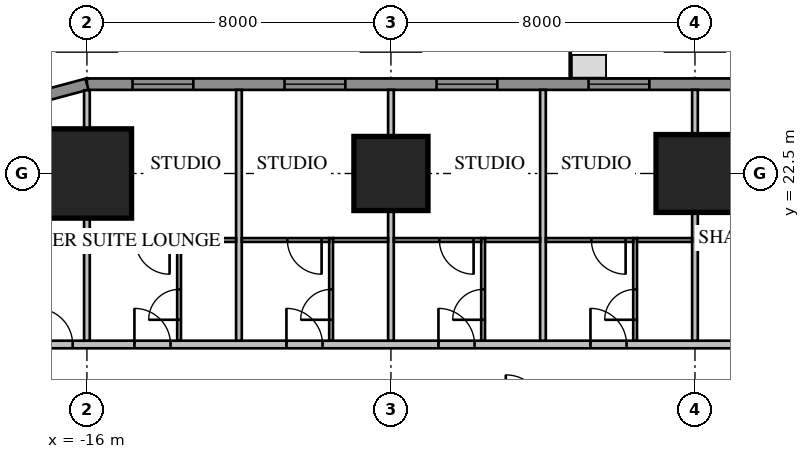
"""IFC4 building model, lengths in metres.
Left out: names, types, materials, properties, quantities, classifications, styles, units other than length and angle.
Written with IfcOpenShell. Run it as: python <this file> out.ifc"""

import sys

from ifc_helpers import new_model, si_unit, direction, frame, frame_2d, origin, origin_2d, place, context, subcontext, project, spatial, rectangle, extrude, element, fill, save


model = new_model("IFC4")
c1 = context("Model", 3, precision=1e-05, world=origin(), true_north=direction((0.0, 1.0)))
c2 = subcontext(c1, "Body", "Model", "MODEL_VIEW")
j1 = project(units=[si_unit("LENGTHUNIT", "METRE"), si_unit("PLANEANGLEUNIT", "RADIAN")], contexts=[c1])
p1 = place(None, origin())
s1 = spatial("IfcSite", under=j1, at=p1, CompositionType="ELEMENT")
p2 = place(p1, origin())
s2 = spatial("IfcBuilding", under=s1, at=p2, CompositionType="ELEMENT")
p3 = place(p2, frame((0.0, 0.0, 27.55)))
s3 = spatial("IfcBuildingStorey", under=s2, at=p3, CompositionType="ELEMENT", Elevation=27.55)
p4 = place(p3, frame((0.0, 22.5, 0.0), z_axis=(0.0, 0.0, 1.0), x_axis=(1.0, 0.0, 0.0)))
e1 = element("IfcColumn", 1, at=p4, inside=s3, PredefinedType="COLUMN", context=c2, shape_type="SweptSolid", body=[
    extrude(rectangle(XDim=2.05, YDim=2.05, at=origin_2d()), origin(), (0.0, 0.0, 1.0), 3.85),
])
p5 = place(p3, frame((-8.0, 22.5, 0.0), z_axis=(0.0, 0.0, 1.0), x_axis=(1.0, 0.0, 0.0)))
e2 = element("IfcColumn", 2, at=p5, inside=s3, PredefinedType="COLUMN", context=c2, shape_type="SweptSolid", body=[
    extrude(rectangle(XDim=1.95, YDim=1.95, at=origin_2d()), origin(), (0.0, 0.0, 1.0), 3.85),
])
p6 = place(p3, frame((-16.0, 22.5, 0.0), z_axis=(0.0, 0.0, 1.0), x_axis=(1.0, 0.0, 0.0)))
e3 = element("IfcColumn", 3, at=p6, inside=s3, PredefinedType="COLUMN", context=c2, shape_type="SweptSolid", body=[
    extrude(rectangle(XDim=2.35, YDim=2.35, at=origin_2d()), origin(), (0.0, 0.0, 1.0), 3.85),
])
p7 = place(p3, frame((16.0, 24.85, 0.0), z_axis=(0.0, 0.0, 1.0), x_axis=(-1.0, 0.0, 0.0)))
e4 = element("IfcWall", 4, at=p7, inside=s3, PredefinedType="SOLIDWALL", context=c2, shape_type="SweptSolid", body=[
    extrude(rectangle(XDim=32.0, YDim=0.3, at=frame_2d((16.0, 0.0))), origin(), (0.0, 0.0, 1.0), 3.65),
])
p8 = place(p7, frame((1.2, 0.0, 0.75)))
e5 = element("IfcOpeningElement", 5, at=p8, cuts=e4, PredefinedType="OPENING", context=c2, shape_type="SweptSolid", body=[
    extrude(rectangle(XDim=1.6, YDim=1.8, at=frame_2d((0.8, 0.9))), frame((0.0, 0.17, 0.0), z_axis=(0.0, -1.0, 0.0), x_axis=(1.0, 0.0, 0.0)), (0.0, 0.0, 1.0), 0.34),
])
p9 = place(p7, frame((5.2, 0.0, 0.75)))
e6 = element("IfcOpeningElement", 6, at=p9, cuts=e4, PredefinedType="OPENING", context=c2, shape_type="SweptSolid", body=[
    extrude(rectangle(XDim=1.6, YDim=1.8, at=frame_2d((0.8, 0.9))), frame((0.0, 0.17, 0.0), z_axis=(0.0, -1.0, 0.0), x_axis=(1.0, 0.0, 0.0)), (0.0, 0.0, 1.0), 0.34),
])
p10 = place(p7, frame((17.2, 0.0, 0.75)))
e7 = element("IfcOpeningElement", 7, at=p10, cuts=e4, PredefinedType="OPENING", context=c2, shape_type="SweptSolid", body=[
    extrude(rectangle(XDim=1.6, YDim=1.8, at=frame_2d((0.8, 0.9))), frame((0.0, 0.17, 0.0), z_axis=(0.0, -1.0, 0.0), x_axis=(1.0, 0.0, 0.0)), (0.0, 0.0, 1.0), 0.34),
])
p11 = place(p7, frame((21.2, 0.0, 0.75)))
e8 = element("IfcOpeningElement", 8, at=p11, cuts=e4, PredefinedType="OPENING", context=c2, shape_type="SweptSolid", body=[
    extrude(rectangle(XDim=1.6, YDim=1.8, at=frame_2d((0.8, 0.9))), frame((0.0, 0.17, 0.0), z_axis=(0.0, -1.0, 0.0), x_axis=(1.0, 0.0, 0.0)), (0.0, 0.0, 1.0), 0.34),
])
p12 = place(p7, frame((25.2, 0.0, 0.75)))
e9 = element("IfcOpeningElement", 9, at=p12, cuts=e4, PredefinedType="OPENING", context=c2, shape_type="SweptSolid", body=[
    extrude(rectangle(XDim=1.6, YDim=1.8, at=frame_2d((0.8, 0.9))), frame((0.0, 0.17, 0.0), z_axis=(0.0, -1.0, 0.0), x_axis=(1.0, 0.0, 0.0)), (0.0, 0.0, 1.0), 0.34),
])
p13 = place(p7, frame((29.2, 0.0, 0.75)))
e10 = element("IfcOpeningElement", 10, at=p13, cuts=e4, PredefinedType="OPENING", context=c2, shape_type="SweptSolid", body=[
    extrude(rectangle(XDim=1.6, YDim=1.8, at=frame_2d((0.8, 0.9))), frame((0.0, 0.17, 0.0), z_axis=(0.0, -1.0, 0.0), x_axis=(1.0, 0.0, 0.0)), (0.0, 0.0, 1.0), 0.34),
])
p14 = place(p7, frame((8.8, 0.0, 0.75)))
e11 = element("IfcOpeningElement", 11, at=p14, cuts=e4, PredefinedType="OPENING", context=c2, shape_type="SweptSolid", body=[
    extrude(rectangle(XDim=2.4, YDim=1.8, at=frame_2d((1.2, 0.9))), frame((0.0, 0.17, 0.0), z_axis=(0.0, -1.0, 0.0), x_axis=(1.0, 0.0, 0.0)), (0.0, 0.0, 1.0), 0.34),
])
p15 = place(p7, frame((13.812, 0.0, 0.0)))
e12 = element("IfcOpeningElement", 12, at=p15, cuts=e4, PredefinedType="OPENING", context=c2, shape_type="SweptSolid", body=[
    extrude(rectangle(XDim=1.0, YDim=2.4, at=frame_2d((0.5, 1.2))), frame((0.0, 0.17, 0.0), z_axis=(0.0, -1.0, 0.0), x_axis=(1.0, 0.0, 0.0)), (0.0, 0.0, 1.0), 0.34),
])
p16 = place(p3, frame((-16.0, 24.85, 0.0), z_axis=(0.0, 0.0, 1.0), x_axis=(-0.965920218567, -0.258839972501, 0.0)))
e13 = element("IfcWall", 13, at=p16, inside=s3, PredefinedType="SOLIDWALL", context=c2, shape_type="SweptSolid", body=[
    extrude(rectangle(XDim=4.581, YDim=0.3, at=frame_2d((2.291, 0.0))), origin(), (0.0, 0.0, 1.0), 3.65),
])
p17 = place(p3, frame((18.0, 18.0, 0.0), z_axis=(0.0, 0.0, 1.0), x_axis=(-1.0, 0.0, 0.0)))
e14 = element("IfcWall", 14, at=p17, inside=s3, PredefinedType="PARTITIONING", context=c2, shape_type="SweptSolid", body=[
    extrude(rectangle(XDim=36.0, YDim=0.2, at=frame_2d((18.0, 0.0))), origin(), (0.0, 0.0, 1.0), 3.65),
])
p18 = place(p17, frame((0.375, 0.0, 0.0)))
e15 = element("IfcOpeningElement", 15, at=p18, cuts=e14, PredefinedType="OPENING", context=c2, shape_type="SweptSolid", body=[
    extrude(rectangle(XDim=1.0, YDim=2.1, at=frame_2d((0.5, 1.05))), frame((0.0, 0.12, 0.0), z_axis=(0.0, -1.0, 0.0), x_axis=(1.0, 0.0, 0.0)), (0.0, 0.0, 1.0), 0.24),
])
p19 = place(p17, frame((3.8, 0.0, 0.0)))
e16 = element("IfcOpeningElement", 16, at=p19, cuts=e14, PredefinedType="OPENING", context=c2, shape_type="SweptSolid", body=[
    extrude(rectangle(XDim=0.95, YDim=2.1, at=frame_2d((0.475, 1.05))), frame((0.0, 0.12, 0.0), z_axis=(0.0, -1.0, 0.0), x_axis=(1.0, 0.0, 0.0)), (0.0, 0.0, 1.0), 0.24),
])
p20 = place(p17, frame((7.8, 0.0, 0.0)))
e17 = element("IfcOpeningElement", 17, at=p20, cuts=e14, PredefinedType="OPENING", context=c2, shape_type="SweptSolid", body=[
    extrude(rectangle(XDim=0.95, YDim=2.1, at=frame_2d((0.475, 1.05))), frame((0.0, 0.12, 0.0), z_axis=(0.0, -1.0, 0.0), x_axis=(1.0, 0.0, 0.0)), (0.0, 0.0, 1.0), 0.24),
])
p21 = place(p17, frame((19.8, 0.0, 0.0)))
e18 = element("IfcOpeningElement", 18, at=p21, cuts=e14, PredefinedType="OPENING", context=c2, shape_type="SweptSolid", body=[
    extrude(rectangle(XDim=0.95, YDim=2.1, at=frame_2d((0.475, 1.05))), frame((0.0, 0.12, 0.0), z_axis=(0.0, -1.0, 0.0), x_axis=(1.0, 0.0, 0.0)), (0.0, 0.0, 1.0), 0.24),
])
p22 = place(p17, frame((23.8, 0.0, 0.0)))
e19 = element("IfcOpeningElement", 19, at=p22, cuts=e14, PredefinedType="OPENING", context=c2, shape_type="SweptSolid", body=[
    extrude(rectangle(XDim=0.95, YDim=2.1, at=frame_2d((0.475, 1.05))), frame((0.0, 0.12, 0.0), z_axis=(0.0, -1.0, 0.0), x_axis=(1.0, 0.0, 0.0)), (0.0, 0.0, 1.0), 0.24),
])
p23 = place(p17, frame((27.8, 0.0, 0.0)))
e20 = element("IfcOpeningElement", 20, at=p23, cuts=e14, PredefinedType="OPENING", context=c2, shape_type="SweptSolid", body=[
    extrude(rectangle(XDim=0.95, YDim=2.1, at=frame_2d((0.475, 1.05))), frame((0.0, 0.12, 0.0), z_axis=(0.0, -1.0, 0.0), x_axis=(1.0, 0.0, 0.0)), (0.0, 0.0, 1.0), 0.24),
])
p24 = place(p17, frame((31.8, 0.0, 0.0)))
e21 = element("IfcOpeningElement", 21, at=p24, cuts=e14, PredefinedType="OPENING", context=c2, shape_type="SweptSolid", body=[
    extrude(rectangle(XDim=0.95, YDim=2.1, at=frame_2d((0.475, 1.05))), frame((0.0, 0.12, 0.0), z_axis=(0.0, -1.0, 0.0), x_axis=(1.0, 0.0, 0.0)), (0.0, 0.0, 1.0), 0.24),
])
p25 = place(p17, frame((34.375, 0.0, 0.0)))
e22 = element("IfcOpeningElement", 22, at=p25, cuts=e14, PredefinedType="OPENING", context=c2, shape_type="SweptSolid", body=[
    extrude(rectangle(XDim=0.95, YDim=2.1, at=frame_2d((0.475, 1.05))), frame((0.0, 0.12, 0.0), z_axis=(0.0, -1.0, 0.0), x_axis=(1.0, 0.0, 0.0)), (0.0, 0.0, 1.0), 0.24),
])
p26 = place(p17, frame((11.2, 0.0, 0.0)))
e23 = element("IfcOpeningElement", 23, at=p26, cuts=e14, PredefinedType="OPENING", context=c2, shape_type="SweptSolid", body=[
    extrude(rectangle(XDim=1.0, YDim=2.1, at=frame_2d((0.5, 1.05))), frame((0.0, 0.12, 0.0), z_axis=(0.0, -1.0, 0.0), x_axis=(1.0, 0.0, 0.0)), (0.0, 0.0, 1.0), 0.24),
])
p27 = place(p3, frame((0.0, 18.1, 0.0), z_axis=(0.0, 0.0, 1.0), x_axis=(0.0, 1.0, 0.0)))
e24 = element("IfcWall", 24, at=p27, inside=s3, PredefinedType="PARTITIONING", context=c2, shape_type="SweptSolid", body=[
    extrude(rectangle(XDim=6.6, YDim=0.15, at=frame_2d((3.3, 0.0))), origin(), (0.0, 0.0, 1.0), 2.809),
])
for number, where, z_axis, x_axis in (
    (25, (-4.0, 18.1, 0.0), (0.0, 0.0, 1.0), (0.0, 1.0, 0.0)),
    (26, (-8.0, 18.1, 0.0), (0.0, 0.0, 1.0), (0.0, 1.0, 0.0)),
    (27, (-12.0, 18.1, 0.0), (0.0, 0.0, 1.0), (0.0, 1.0, 0.0)),
):
    element("IfcWall", number, at=place(p3, frame(where, z_axis=z_axis, x_axis=x_axis)), inside=s3, PredefinedType="PARTITIONING", context=c2, shape_type="SweptSolid", body=[
        extrude(rectangle(XDim=6.6, YDim=0.15, at=frame_2d((3.3, 0.0))), origin(), (0.0, 0.0, 1.0), 3.65),
    ])
p28 = place(p3, frame((-16.0, 18.1, 0.0), z_axis=(0.0, 0.0, 1.0), x_axis=(0.0, 1.0, 0.0)))
e28 = element("IfcWall", 28, at=p28, inside=s3, PredefinedType="PARTITIONING", context=c2, shape_type="SweptSolid", body=[
    extrude(rectangle(XDim=6.589, YDim=0.15, at=frame_2d((3.295, 0.0))), origin(), (0.0, 0.0, 1.0), 3.65),
])
p29 = place(p3, frame((-1.575, 18.1, 0.0), z_axis=(0.0, 0.0, 1.0), x_axis=(0.0, 1.0, 0.0)))
e29 = element("IfcWall", 29, at=p29, inside=s3, PredefinedType="PARTITIONING", context=c2, shape_type="SweptSolid", body=[
    extrude(rectangle(XDim=2.7, YDim=0.1, at=frame_2d((1.35, 0.0))), origin(), (0.0, 0.0, 1.0), 3.65),
])
p30 = place(p29, frame((0.55, 0.0, 0.0)))
e30 = element("IfcOpeningElement", 30, at=p30, cuts=e29, PredefinedType="OPENING", context=c2, shape_type="SweptSolid", body=[
    extrude(rectangle(XDim=0.8, YDim=2.1, at=frame_2d((0.4, 1.05))), frame((0.0, 0.07, 0.0), z_axis=(0.0, -1.0, 0.0), x_axis=(1.0, 0.0, 0.0)), (0.0, 0.0, 1.0), 0.14),
])
p31 = place(p3, frame((-0.075, 20.75, 0.0), z_axis=(0.0, 0.0, 1.0), x_axis=(-1.0, 0.0, 0.0)))
e31 = element("IfcWall", 31, at=p31, inside=s3, PredefinedType="PARTITIONING", context=c2, shape_type="SweptSolid", body=[
    extrude(rectangle(XDim=1.45, YDim=0.1, at=frame_2d((0.725, 0.0))), origin(), (0.0, 0.0, 1.0), 3.65),
])
p32 = place(p3, frame((-5.575, 18.1, 0.0), z_axis=(0.0, 0.0, 1.0), x_axis=(0.0, 1.0, 0.0)))
e32 = element("IfcWall", 32, at=p32, inside=s3, PredefinedType="PARTITIONING", context=c2, shape_type="SweptSolid", body=[
    extrude(rectangle(XDim=2.7, YDim=0.1, at=frame_2d((1.35, 0.0))), origin(), (0.0, 0.0, 1.0), 3.65),
])
p33 = place(p32, frame((0.55, 0.0, 0.0)))
e33 = element("IfcOpeningElement", 33, at=p33, cuts=e32, PredefinedType="OPENING", context=c2, shape_type="SweptSolid", body=[
    extrude(rectangle(XDim=0.8, YDim=2.1, at=frame_2d((0.4, 1.05))), frame((0.0, 0.07, 0.0), z_axis=(0.0, -1.0, 0.0), x_axis=(1.0, 0.0, 0.0)), (0.0, 0.0, 1.0), 0.14),
])
p34 = place(p3, frame((-4.075, 20.75, 0.0), z_axis=(0.0, 0.0, 1.0), x_axis=(-1.0, 0.0, 0.0)))
e34 = element("IfcWall", 34, at=p34, inside=s3, PredefinedType="PARTITIONING", context=c2, shape_type="SweptSolid", body=[
    extrude(rectangle(XDim=1.45, YDim=0.1, at=frame_2d((0.725, 0.0))), origin(), (0.0, 0.0, 1.0), 3.65),
])
p35 = place(p3, frame((-9.575, 18.1, 0.0), z_axis=(0.0, 0.0, 1.0), x_axis=(0.0, 1.0, 0.0)))
e35 = element("IfcWall", 35, at=p35, inside=s3, PredefinedType="PARTITIONING", context=c2, shape_type="SweptSolid", body=[
    extrude(rectangle(XDim=2.7, YDim=0.1, at=frame_2d((1.35, 0.0))), origin(), (0.0, 0.0, 1.0), 3.65),
])
p36 = place(p35, frame((0.55, 0.0, 0.0)))
e36 = element("IfcOpeningElement", 36, at=p36, cuts=e35, PredefinedType="OPENING", context=c2, shape_type="SweptSolid", body=[
    extrude(rectangle(XDim=0.8, YDim=2.1, at=frame_2d((0.4, 1.05))), frame((0.0, 0.07, 0.0), z_axis=(0.0, -1.0, 0.0), x_axis=(1.0, 0.0, 0.0)), (0.0, 0.0, 1.0), 0.14),
])
p37 = place(p3, frame((-8.075, 20.75, 0.0), z_axis=(0.0, 0.0, 1.0), x_axis=(-1.0, 0.0, 0.0)))
e37 = element("IfcWall", 37, at=p37, inside=s3, PredefinedType="PARTITIONING", context=c2, shape_type="SweptSolid", body=[
    extrude(rectangle(XDim=1.45, YDim=0.1, at=frame_2d((0.725, 0.0))), origin(), (0.0, 0.0, 1.0), 3.65),
])
p38 = place(p3, frame((-13.575, 18.1, 0.0), z_axis=(0.0, 0.0, 1.0), x_axis=(0.0, 1.0, 0.0)))
e38 = element("IfcWall", 38, at=p38, inside=s3, PredefinedType="PARTITIONING", context=c2, shape_type="SweptSolid", body=[
    extrude(rectangle(XDim=2.7, YDim=0.1, at=frame_2d((1.35, 0.0))), origin(), (0.0, 0.0, 1.0), 3.65),
])
p39 = place(p38, frame((0.55, 0.0, 0.0)))
e39 = element("IfcOpeningElement", 39, at=p39, cuts=e38, PredefinedType="OPENING", context=c2, shape_type="SweptSolid", body=[
    extrude(rectangle(XDim=0.8, YDim=2.1, at=frame_2d((0.4, 1.05))), frame((0.0, 0.07, 0.0), z_axis=(0.0, -1.0, 0.0), x_axis=(1.0, 0.0, 0.0)), (0.0, 0.0, 1.0), 0.14),
])
p40 = place(p3, frame((-12.075, 20.75, 0.0), z_axis=(0.0, 0.0, 1.0), x_axis=(-1.0, 0.0, 0.0)))
e40 = element("IfcWall", 40, at=p40, inside=s3, PredefinedType="PARTITIONING", context=c2, shape_type="SweptSolid", body=[
    extrude(rectangle(XDim=1.45, YDim=0.1, at=frame_2d((0.725, 0.0))), origin(), (0.0, 0.0, 1.0), 3.65),
])
p41 = place(p3, frame((-1.625, 20.75, 0.0), z_axis=(0.0, 0.0, 1.0), x_axis=(-1.0, 0.0, 0.0)))
e41 = element("IfcWall", 41, at=p41, inside=s3, PredefinedType="PARTITIONING", context=c2, shape_type="SweptSolid", body=[
    extrude(rectangle(XDim=2.3, YDim=0.1, at=frame_2d((1.15, 0.0))), origin(), (0.0, 0.0, 1.0), 3.65),
])
p42 = place(p41, frame((0.2, 0.0, 0.0)))
e42 = element("IfcOpeningElement", 42, at=p42, cuts=e41, PredefinedType="OPENING", context=c2, shape_type="SweptSolid", body=[
    extrude(rectangle(XDim=0.9, YDim=2.1, at=frame_2d((0.45, 1.05))), frame((0.0, 0.07, 0.0), z_axis=(0.0, -1.0, 0.0), x_axis=(1.0, 0.0, 0.0)), (0.0, 0.0, 1.0), 0.14),
])
p43 = place(p3, frame((-5.625, 20.75, 0.0), z_axis=(0.0, 0.0, 1.0), x_axis=(-1.0, 0.0, 0.0)))
e43 = element("IfcWall", 43, at=p43, inside=s3, PredefinedType="PARTITIONING", context=c2, shape_type="SweptSolid", body=[
    extrude(rectangle(XDim=2.3, YDim=0.1, at=frame_2d((1.15, 0.0))), origin(), (0.0, 0.0, 1.0), 3.65),
])
p44 = place(p43, frame((0.2, 0.0, 0.0)))
e44 = element("IfcOpeningElement", 44, at=p44, cuts=e43, PredefinedType="OPENING", context=c2, shape_type="SweptSolid", body=[
    extrude(rectangle(XDim=0.9, YDim=2.1, at=frame_2d((0.45, 1.05))), frame((0.0, 0.07, 0.0), z_axis=(0.0, -1.0, 0.0), x_axis=(1.0, 0.0, 0.0)), (0.0, 0.0, 1.0), 0.14),
])
p45 = place(p3, frame((-9.625, 20.75, 0.0), z_axis=(0.0, 0.0, 1.0), x_axis=(-1.0, 0.0, 0.0)))
e45 = element("IfcWall", 45, at=p45, inside=s3, PredefinedType="PARTITIONING", context=c2, shape_type="SweptSolid", body=[
    extrude(rectangle(XDim=2.3, YDim=0.1, at=frame_2d((1.15, 0.0))), origin(), (0.0, 0.0, 1.0), 3.65),
])
p46 = place(p45, frame((0.2, 0.0, 0.0)))
e46 = element("IfcOpeningElement", 46, at=p46, cuts=e45, PredefinedType="OPENING", context=c2, shape_type="SweptSolid", body=[
    extrude(rectangle(XDim=0.9, YDim=2.1, at=frame_2d((0.45, 1.05))), frame((0.0, 0.07, 0.0), z_axis=(0.0, -1.0, 0.0), x_axis=(1.0, 0.0, 0.0)), (0.0, 0.0, 1.0), 0.14),
])
p47 = place(p3, frame((-13.625, 20.75, 0.0), z_axis=(0.0, 0.0, 1.0), x_axis=(-1.0, 0.0, 0.0)))
e47 = element("IfcWall", 47, at=p47, inside=s3, PredefinedType="PARTITIONING", context=c2, shape_type="SweptSolid", body=[
    extrude(rectangle(XDim=2.3, YDim=0.1, at=frame_2d((1.15, 0.0))), origin(), (0.0, 0.0, 1.0), 3.65),
])
p48 = place(p47, frame((0.2, 0.0, 0.0)))
e48 = element("IfcOpeningElement", 48, at=p48, cuts=e47, PredefinedType="OPENING", context=c2, shape_type="SweptSolid", body=[
    extrude(rectangle(XDim=0.9, YDim=2.1, at=frame_2d((0.45, 1.05))), frame((0.0, 0.07, 0.0), z_axis=(0.0, -1.0, 0.0), x_axis=(1.0, 0.0, 0.0)), (0.0, 0.0, 1.0), 0.14),
])
p49 = place(p10, origin())
e49 = element("IfcWindow", 49, at=p49, inside=s3, PartitioningType="SINGLE_PANEL", PredefinedType="WINDOW", context=c2, shape_type="SweptSolid", body=[
    extrude(rectangle(XDim=1.6, YDim=1.8, at=frame_2d((0.8, 0.9))), frame((0.0, 0.03, 0.0), z_axis=(0.0, -1.0, 0.0), x_axis=(1.0, 0.0, 0.0)), (0.0, 0.0, 1.0), 0.06),
])
fill(e7, e49)
p50 = place(p11, origin())
e50 = element("IfcWindow", 50, at=p50, inside=s3, PartitioningType="SINGLE_PANEL", PredefinedType="WINDOW", context=c2, shape_type="SweptSolid", body=[
    extrude(rectangle(XDim=1.6, YDim=1.8, at=frame_2d((0.8, 0.9))), frame((0.0, 0.03, 0.0), z_axis=(0.0, -1.0, 0.0), x_axis=(1.0, 0.0, 0.0)), (0.0, 0.0, 1.0), 0.06),
])
fill(e8, e50)
p51 = place(p12, origin())
e51 = element("IfcWindow", 51, at=p51, inside=s3, PartitioningType="SINGLE_PANEL", PredefinedType="WINDOW", context=c2, shape_type="SweptSolid", body=[
    extrude(rectangle(XDim=1.6, YDim=1.8, at=frame_2d((0.8, 0.9))), frame((0.0, 0.03, 0.0), z_axis=(0.0, -1.0, 0.0), x_axis=(1.0, 0.0, 0.0)), (0.0, 0.0, 1.0), 0.06),
])
fill(e9, e51)
p52 = place(p13, origin())
e52 = element("IfcWindow", 52, at=p52, inside=s3, PartitioningType="SINGLE_PANEL", PredefinedType="WINDOW", context=c2, shape_type="SweptSolid", body=[
    extrude(rectangle(XDim=1.6, YDim=1.8, at=frame_2d((0.8, 0.9))), frame((0.0, 0.03, 0.0), z_axis=(0.0, -1.0, 0.0), x_axis=(1.0, 0.0, 0.0)), (0.0, 0.0, 1.0), 0.06),
])
fill(e10, e52)
p53 = place(p21, origin())
e53 = element("IfcDoor", 53, at=p53, inside=s3, OperationType="SINGLE_SWING_RIGHT", PredefinedType="DOOR", context=c2, shape_type="SweptSolid", body=[
    extrude(rectangle(XDim=0.95, YDim=2.1, at=frame_2d((0.475, 1.05))), frame((0.0, 0.025, 0.0), z_axis=(0.0, -1.0, 0.0), x_axis=(1.0, 0.0, 0.0)), (0.0, 0.0, 1.0), 0.05),
])
fill(e18, e53)
p54 = place(p30, origin())
e54 = element("IfcDoor", 54, at=p54, inside=s3, OperationType="SINGLE_SWING_LEFT", PredefinedType="DOOR", context=c2, shape_type="SweptSolid", body=[
    extrude(rectangle(XDim=0.8, YDim=2.1, at=frame_2d((0.4, 1.05))), frame((0.0, 0.025, 0.0), z_axis=(0.0, -1.0, 0.0), x_axis=(1.0, 0.0, 0.0)), (0.0, 0.0, 1.0), 0.05),
])
fill(e30, e54)
p55 = place(p22, origin())
e55 = element("IfcDoor", 55, at=p55, inside=s3, OperationType="SINGLE_SWING_RIGHT", PredefinedType="DOOR", context=c2, shape_type="SweptSolid", body=[
    extrude(rectangle(XDim=0.95, YDim=2.1, at=frame_2d((0.475, 1.05))), frame((0.0, 0.025, 0.0), z_axis=(0.0, -1.0, 0.0), x_axis=(1.0, 0.0, 0.0)), (0.0, 0.0, 1.0), 0.05),
])
fill(e19, e55)
p56 = place(p33, origin())
e56 = element("IfcDoor", 56, at=p56, inside=s3, OperationType="SINGLE_SWING_LEFT", PredefinedType="DOOR", context=c2, shape_type="SweptSolid", body=[
    extrude(rectangle(XDim=0.8, YDim=2.1, at=frame_2d((0.4, 1.05))), frame((0.0, 0.025, 0.0), z_axis=(0.0, -1.0, 0.0), x_axis=(1.0, 0.0, 0.0)), (0.0, 0.0, 1.0), 0.05),
])
fill(e33, e56)
p57 = place(p23, origin())
e57 = element("IfcDoor", 57, at=p57, inside=s3, OperationType="SINGLE_SWING_RIGHT", PredefinedType="DOOR", context=c2, shape_type="SweptSolid", body=[
    extrude(rectangle(XDim=0.95, YDim=2.1, at=frame_2d((0.475, 1.05))), frame((0.0, 0.025, 0.0), z_axis=(0.0, -1.0, 0.0), x_axis=(1.0, 0.0, 0.0)), (0.0, 0.0, 1.0), 0.05),
])
fill(e20, e57)
p58 = place(p36, origin())
e58 = element("IfcDoor", 58, at=p58, inside=s3, OperationType="SINGLE_SWING_LEFT", PredefinedType="DOOR", context=c2, shape_type="SweptSolid", body=[
    extrude(rectangle(XDim=0.8, YDim=2.1, at=frame_2d((0.4, 1.05))), frame((0.0, 0.025, 0.0), z_axis=(0.0, -1.0, 0.0), x_axis=(1.0, 0.0, 0.0)), (0.0, 0.0, 1.0), 0.05),
])
fill(e36, e58)
p59 = place(p24, origin())
e59 = element("IfcDoor", 59, at=p59, inside=s3, OperationType="SINGLE_SWING_RIGHT", PredefinedType="DOOR", context=c2, shape_type="SweptSolid", body=[
    extrude(rectangle(XDim=0.95, YDim=2.1, at=frame_2d((0.475, 1.05))), frame((0.0, 0.025, 0.0), z_axis=(0.0, -1.0, 0.0), x_axis=(1.0, 0.0, 0.0)), (0.0, 0.0, 1.0), 0.05),
])
fill(e21, e59)
p60 = place(p39, origin())
e60 = element("IfcDoor", 60, at=p60, inside=s3, OperationType="SINGLE_SWING_LEFT", PredefinedType="DOOR", context=c2, shape_type="SweptSolid", body=[
    extrude(rectangle(XDim=0.8, YDim=2.1, at=frame_2d((0.4, 1.05))), frame((0.0, 0.025, 0.0), z_axis=(0.0, -1.0, 0.0), x_axis=(1.0, 0.0, 0.0)), (0.0, 0.0, 1.0), 0.05),
])
fill(e39, e60)
p61 = place(p25, origin())
e61 = element("IfcDoor", 61, at=p61, inside=s3, OperationType="SINGLE_SWING_RIGHT", PredefinedType="DOOR", context=c2, shape_type="SweptSolid", body=[
    extrude(rectangle(XDim=0.95, YDim=2.1, at=frame_2d((0.475, 1.05))), frame((0.0, 0.025, 0.0), z_axis=(0.0, -1.0, 0.0), x_axis=(1.0, 0.0, 0.0)), (0.0, 0.0, 1.0), 0.05),
])
fill(e22, e61)
p62 = place(p42, origin())
e62 = element("IfcDoor", 62, at=p62, inside=s3, OperationType="SINGLE_SWING_LEFT", PredefinedType="DOOR", context=c2, shape_type="SweptSolid", body=[
    extrude(rectangle(XDim=0.9, YDim=2.1, at=frame_2d((0.45, 1.05))), frame((0.0, 0.025, 0.0), z_axis=(0.0, -1.0, 0.0), x_axis=(1.0, 0.0, 0.0)), (0.0, 0.0, 1.0), 0.05),
])
fill(e42, e62)
p63 = place(p44, origin())
e63 = element("IfcDoor", 63, at=p63, inside=s3, OperationType="SINGLE_SWING_LEFT", PredefinedType="DOOR", context=c2, shape_type="SweptSolid", body=[
    extrude(rectangle(XDim=0.9, YDim=2.1, at=frame_2d((0.45, 1.05))), frame((0.0, 0.025, 0.0), z_axis=(0.0, -1.0, 0.0), x_axis=(1.0, 0.0, 0.0)), (0.0, 0.0, 1.0), 0.05),
])
fill(e44, e63)
p64 = place(p46, origin())
e64 = element("IfcDoor", 64, at=p64, inside=s3, OperationType="SINGLE_SWING_LEFT", PredefinedType="DOOR", context=c2, shape_type="SweptSolid", body=[
    extrude(rectangle(XDim=0.9, YDim=2.1, at=frame_2d((0.45, 1.05))), frame((0.0, 0.025, 0.0), z_axis=(0.0, -1.0, 0.0), x_axis=(1.0, 0.0, 0.0)), (0.0, 0.0, 1.0), 0.05),
])
fill(e46, e64)
p65 = place(p48, origin())
e65 = element("IfcDoor", 65, at=p65, inside=s3, OperationType="SINGLE_SWING_LEFT", PredefinedType="DOOR", context=c2, shape_type="SweptSolid", body=[
    extrude(rectangle(XDim=0.9, YDim=2.1, at=frame_2d((0.45, 1.05))), frame((0.0, 0.025, 0.0), z_axis=(0.0, -1.0, 0.0), x_axis=(1.0, 0.0, 0.0)), (0.0, 0.0, 1.0), 0.05),
])
fill(e48, e65)
save(model, sys.argv[1])
